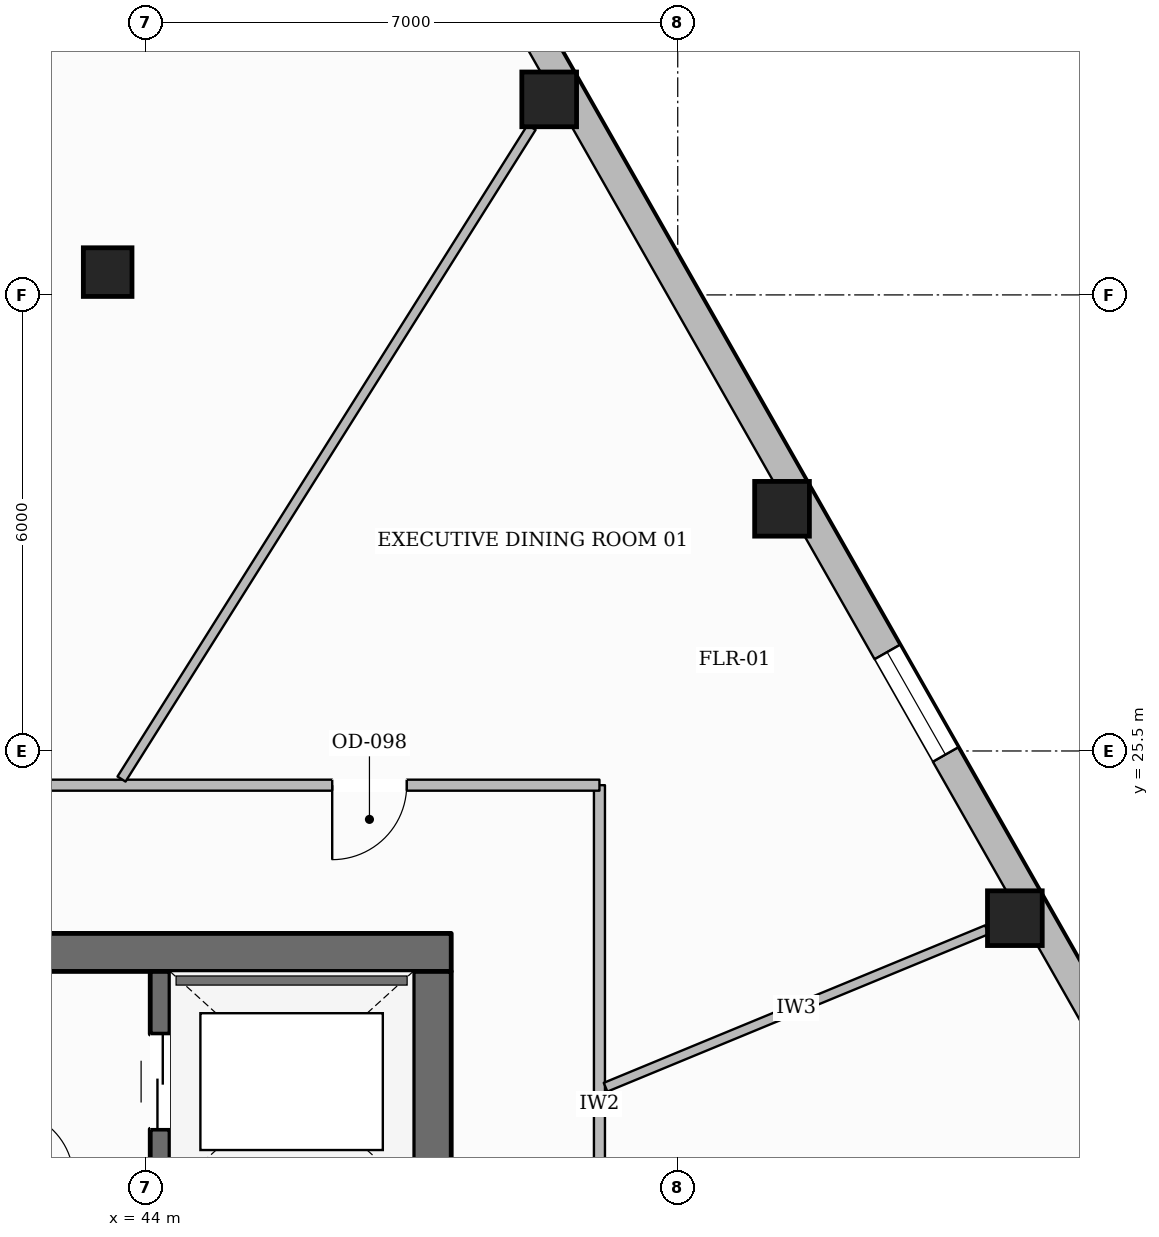
"""IFC4 building model, lengths in metres.
Left out: names, types, materials, properties, quantities, classifications, styles, units other than length and angle.
Written with IfcOpenShell. Run it as: python <this file> out.ifc"""

import sys

from ifc_helpers import new_model, si_unit, direction, frame, frame_2d, origin, origin_2d, place, context, subcontext, project, spatial, rectangle, hollow_rectangle, extrude, element, fill, save


model = new_model("IFC4")
c1 = context("Model", 3, precision=1e-05, world=origin(), true_north=direction((0.0, 1.0)))
c2 = subcontext(c1, "Body", "Model", "MODEL_VIEW")
j1 = project(units=[si_unit("LENGTHUNIT", "METRE"), si_unit("PLANEANGLEUNIT", "RADIAN")], contexts=[c1])
p1 = place(None, origin())
s1 = spatial("IfcSite", under=j1, at=p1, CompositionType="ELEMENT")
p2 = place(p1, origin())
s2 = spatial("IfcBuilding", under=s1, at=p2, CompositionType="ELEMENT")
p3 = place(p2, frame((0.0, 0.0, 150.95)))
s3 = spatial("IfcBuildingStorey", under=s2, at=p3, CompositionType="ELEMENT", Elevation=150.95)
p4 = place(p3, frame((27.98, 22.85, 0.0), z_axis=(0.0, 0.0, 1.0), x_axis=(1.0, 0.0, 0.0)))
e1 = element("IfcWall", 1, at=p4, inside=s3, PredefinedType="SOLIDWALL", context=c2, shape_type="SweptSolid", body=[
    extrude(rectangle(XDim=20.04, YDim=0.5, at=frame_2d((10.02, 0.0))), origin(), (0.0, 0.0, 1.0), 3.43),
])
p5 = place(p4, frame((6.295, 0.0, 0.0)))
e2 = element("IfcOpeningElement", 2, at=p5, cuts=e1, PredefinedType="OPENING", context=c2, shape_type="SweptSolid", body=[
    extrude(rectangle(XDim=1.05, YDim=2.15, at=frame_2d((0.525, 1.075))), frame((0.0, 0.26, 0.0), z_axis=(0.0, -1.0, 0.0), x_axis=(1.0, 0.0, 0.0)), (0.0, 0.0, 1.0), 0.52),
])
p6 = place(p4, frame((12.695, 0.0, 0.0)))
e3 = element("IfcOpeningElement", 3, at=p6, cuts=e1, PredefinedType="OPENING", context=c2, shape_type="SweptSolid", body=[
    extrude(rectangle(XDim=1.05, YDim=2.15, at=frame_2d((0.525, 1.075))), frame((0.0, 0.26, 0.0), z_axis=(0.0, -1.0, 0.0), x_axis=(1.0, 0.0, 0.0)), (0.0, 0.0, 1.0), 0.52),
])
p7 = place(p3, frame((47.77, 9.6, 0.0), z_axis=(0.0, 0.0, 1.0), x_axis=(0.0, 1.0, 0.0)))
e4 = element("IfcWall", 4, at=p7, inside=s3, PredefinedType="SOLIDWALL", context=c2, shape_type="SweptSolid", body=[
    extrude(rectangle(XDim=13.0, YDim=0.5, at=frame_2d((6.5, 0.0))), origin(), (0.0, 0.0, 1.0), 3.43),
])
p8 = place(p7, frame((0.2, 0.0, 0.0)))
e5 = element("IfcOpeningElement", 5, at=p8, cuts=e4, PredefinedType="OPENING", context=c2, shape_type="SweptSolid", body=[
    extrude(rectangle(XDim=1.1, YDim=2.15, at=frame_2d((0.55, 1.075))), frame((0.0, 0.26, 0.0), z_axis=(0.0, -1.0, 0.0), x_axis=(1.0, 0.0, 0.0)), (0.0, 0.0, 1.0), 0.52),
])
p9 = place(p7, frame((8.4, 0.0, 0.0)))
e6 = element("IfcOpeningElement", 6, at=p9, cuts=e4, PredefinedType="OPENING", context=c2, shape_type="SweptSolid", body=[
    extrude(rectangle(XDim=0.9, YDim=2.1, at=frame_2d((0.45, 1.05))), frame((0.0, 0.26, 0.0), z_axis=(0.0, -1.0, 0.0), x_axis=(1.0, 0.0, 0.0)), (0.0, 0.0, 1.0), 0.52),
])
p10 = place(p3, frame((44.19, 9.6, 0.0), z_axis=(0.0, 0.0, 1.0), x_axis=(0.0, 1.0, 0.0)))
e7 = element("IfcWall", 7, at=p10, inside=s3, PredefinedType="SHEAR", context=c2, shape_type="SweptSolid", body=[
    extrude(rectangle(XDim=13.0, YDim=0.26, at=frame_2d((6.5, 0.0))), origin(), (0.0, 0.0, 1.0), 3.43),
])
p11 = place(p10, frame((10.925, 0.0, 0.0)))
e8 = element("IfcOpeningElement", 8, at=p11, cuts=e7, PredefinedType="OPENING", context=c2, shape_type="SweptSolid", body=[
    extrude(rectangle(XDim=1.25, YDim=2.25, at=frame_2d((0.625, 1.125))), frame((0.0, 0.14, 0.0), z_axis=(0.0, -1.0, 0.0), x_axis=(1.0, 0.0, 0.0)), (0.0, 0.0, 1.0), 0.28),
])
for number, where, z_axis, x_axis in (
    (9, (55.435, 23.3, 0.0), (0.0, 0.0, 1.0), (1.0, 0.0, 0.0)),
    (10, (52.372, 28.686, 0.0), (0.0, 0.0, 1.0), (1.0, 0.0, 0.0)),
    (11, (49.309, 34.073, 0.0), (0.0, 0.0, 1.0), (1.0, 0.0, 0.0)),
):
    element("IfcColumn", number, at=place(p3, frame(where, z_axis=z_axis, x_axis=x_axis)), inside=s3, PredefinedType="COLUMN", context=c2, shape_type="SweptSolid", body=[
        extrude(hollow_rectangle(XDim=0.72, YDim=0.72, WallThickness=0.032, at=origin_2d()), origin(), (0.0, 0.0, 1.0), 3.43),
    ])
p12 = place(p3, frame((43.5, 31.8, 0.0), z_axis=(0.0, 0.0, 1.0), x_axis=(1.0, 0.0, 0.0)))
e12 = element("IfcColumn", 12, at=p12, inside=s3, PredefinedType="COLUMN", context=c2, shape_type="SweptSolid", body=[
    extrude(hollow_rectangle(XDim=0.64, YDim=0.64, WallThickness=0.028, at=origin_2d()), origin(), (0.0, 0.0, 1.0), 3.43),
])
p13 = place(p3, frame((43.179, 45.396, 0.0), z_axis=(0.0, 0.0, 1.0), x_axis=(0.494363218784, -0.869255433065, 0.0)))
e13 = element("IfcWall", 13, at=p13, inside=s3, PredefinedType="STANDARD", context=c2, shape_type="SweptSolid", body=[
    extrude(rectangle(XDim=38.134, YDim=0.38, at=frame_2d((19.067, 0.0))), origin(), (0.0, 0.0, 1.0), 2.889),
])
p14 = place(p13, frame((9.134, 0.0, 0.0)))
e14 = element("IfcOpeningElement", 14, at=p14, cuts=e13, PredefinedType="OPENING", context=c2, shape_type="SweptSolid", body=[
    extrude(rectangle(XDim=1.0, YDim=2.2, at=frame_2d((0.5, 1.1))), frame((0.0, 0.2, 0.0), z_axis=(0.0, -1.0, 0.0), x_axis=(1.0, 0.0, 0.0)), (0.0, 0.0, 1.0), 0.4),
])
p15 = place(p13, frame((33.785, 0.0, 0.55)))
e15 = element("IfcOpeningElement", 15, at=p15, cuts=e13, PredefinedType="OPENING", context=c2, shape_type="SweptSolid", body=[
    extrude(rectangle(XDim=1.55, YDim=1.6, at=frame_2d((0.775, 0.8))), frame((0.0, 0.2, 0.0), z_axis=(0.0, -1.0, 0.0), x_axis=(1.0, 0.0, 0.0)), (0.0, 0.0, 1.0), 0.4),
])
p16 = place(p13, frame((27.589, 0.0, 0.55)))
e16 = element("IfcOpeningElement", 16, at=p16, cuts=e13, PredefinedType="OPENING", context=c2, shape_type="SweptSolid", body=[
    extrude(rectangle(XDim=1.55, YDim=1.6, at=frame_2d((0.775, 0.8))), frame((0.0, 0.2, 0.0), z_axis=(0.0, -1.0, 0.0), x_axis=(1.0, 0.0, 0.0)), (0.0, 0.0, 1.0), 0.4),
])
p17 = place(p13, frame((21.393, 0.0, 0.55)))
e17 = element("IfcOpeningElement", 17, at=p17, cuts=e13, PredefinedType="OPENING", context=c2, shape_type="SweptSolid", body=[
    extrude(rectangle(XDim=1.55, YDim=1.6, at=frame_2d((0.775, 0.8))), frame((0.0, 0.2, 0.0), z_axis=(0.0, -1.0, 0.0), x_axis=(1.0, 0.0, 0.0)), (0.0, 0.0, 1.0), 0.4),
])
p18 = place(p13, frame((2.805, 0.0, 0.55)))
e18 = element("IfcOpeningElement", 18, at=p18, cuts=e13, PredefinedType="OPENING", context=c2, shape_type="SweptSolid", body=[
    extrude(rectangle(XDim=1.55, YDim=1.6, at=frame_2d((0.775, 0.8))), frame((0.0, 0.2, 0.0), z_axis=(0.0, -1.0, 0.0), x_axis=(1.0, 0.0, 0.0)), (0.0, 0.0, 1.0), 0.4),
])
p19 = place(p3, frame((49.97, 7.15, 0.0), z_axis=(0.0, 0.0, 1.0), x_axis=(0.0, 1.0, 0.0)))
e19 = element("IfcWall", 19, at=p19, inside=s3, PredefinedType="PARTITIONING", context=c2, shape_type="SweptSolid", body=[
    extrude(rectangle(XDim=17.9, YDim=0.145, at=frame_2d((8.95, 0.0))), origin(), (0.0, 0.0, 1.0), 3.118),
])
p20 = place(p19, frame((8.246, 0.0, 0.0)))
e20 = element("IfcOpeningElement", 20, at=p20, cuts=e19, PredefinedType="OPENING", context=c2, shape_type="SweptSolid", body=[
    extrude(rectangle(XDim=1.02, YDim=2.15, at=frame_2d((0.51, 1.075))), frame((0.0, 0.083, 0.0), z_axis=(0.0, -1.0, 0.0), x_axis=(1.0, 0.0, 0.0)), (0.0, 0.0, 1.0), 0.165),
])
p21 = place(p3, frame((49.97, 25.05, 0.0), z_axis=(0.0, 0.0, 1.0), x_axis=(-1.0, 0.0, 0.0)))
e21 = element("IfcWall", 21, at=p21, inside=s3, PredefinedType="PARTITIONING", context=c2, shape_type="SweptSolid", body=[
    extrude(rectangle(XDim=23.94, YDim=0.145, at=frame_2d((11.97, 0.0))), origin(), (0.0, 0.0, 1.0), 3.43),
])
p22 = place(p21, frame((2.536, 0.0, 0.0)))
e22 = element("IfcOpeningElement", 22, at=p22, cuts=e21, PredefinedType="OPENING", context=c2, shape_type="SweptSolid", body=[
    extrude(rectangle(XDim=0.98, YDim=2.15, at=frame_2d((0.49, 1.075))), frame((0.0, 0.083, 0.0), z_axis=(0.0, -1.0, 0.0), x_axis=(1.0, 0.0, 0.0)), (0.0, 0.0, 1.0), 0.165),
])
p23 = place(p21, frame((9.289, 0.0, 0.0)))
e23 = element("IfcOpeningElement", 23, at=p23, cuts=e21, PredefinedType="OPENING", context=c2, shape_type="SweptSolid", body=[
    extrude(rectangle(XDim=1.4, YDim=2.2, at=frame_2d((0.7, 1.1))), frame((0.0, 0.083, 0.0), z_axis=(0.0, -1.0, 0.0), x_axis=(1.0, 0.0, 0.0)), (0.0, 0.0, 1.0), 0.165),
])
p24 = place(p21, frame((17.451, 0.0, 0.0)))
e24 = element("IfcOpeningElement", 24, at=p24, cuts=e21, PredefinedType="OPENING", context=c2, shape_type="SweptSolid", body=[
    extrude(rectangle(XDim=1.4, YDim=2.2, at=frame_2d((0.7, 1.1))), frame((0.0, 0.083, 0.0), z_axis=(0.0, -1.0, 0.0), x_axis=(1.0, 0.0, 0.0)), (0.0, 0.0, 1.0), 0.165),
])
p25 = place(p3, frame((50.051, 21.076, 0.0), z_axis=(0.0, 0.0, 1.0), x_axis=(0.924287300844, 0.38169750523, 0.0)))
e25 = element("IfcWall", 25, at=p25, inside=s3, PredefinedType="PARTITIONING", context=c2, shape_type="SweptSolid", body=[
    extrude(rectangle(XDim=5.428, YDim=0.125, at=frame_2d((2.714, 0.0))), origin(), (0.0, 0.0, 1.0), 3.43),
])
p26 = place(p3, frame((43.682, 25.131, 0.0), z_axis=(0.0, 0.0, 1.0), x_axis=(0.53258313075, 0.846377698691, 0.0)))
e26 = element("IfcWall", 26, at=p26, inside=s3, PredefinedType="PARTITIONING", context=c2, shape_type="SweptSolid", body=[
    extrude(rectangle(XDim=10.13, YDim=0.125, at=frame_2d((5.065, 0.0))), origin(), (0.0, 0.0, 1.0), 3.43),
])
p27 = place(p17, origin())
e27 = element("IfcWindow", 27, at=p27, inside=s3, PartitioningType="SINGLE_PANEL", PredefinedType="WINDOW", context=c2, shape_type="SweptSolid", body=[
    extrude(rectangle(XDim=1.55, YDim=1.6, at=frame_2d((0.775, 0.8))), frame((0.0, 0.03, 0.0), z_axis=(0.0, -1.0, 0.0), x_axis=(1.0, 0.0, 0.0)), (0.0, 0.0, 1.0), 0.06),
])
fill(e17, e27)
p28 = place(p11, origin())
e28 = element("IfcDoor", 28, at=p28, inside=s3, OperationType="DOUBLE_DOOR_SLIDING", PredefinedType="DOOR", context=c2, shape_type="SweptSolid", body=[
    extrude(rectangle(XDim=1.25, YDim=2.25, at=frame_2d((0.625, 1.125))), frame((0.0, 0.025, 0.0), z_axis=(0.0, -1.0, 0.0), x_axis=(1.0, 0.0, 0.0)), (0.0, 0.0, 1.0), 0.05),
])
fill(e8, e28)
p29 = place(p22, origin())
e29 = element("IfcDoor", 29, at=p29, inside=s3, OperationType="SINGLE_SWING_RIGHT", PredefinedType="DOOR", context=c2, shape_type="SweptSolid", body=[
    extrude(rectangle(XDim=0.98, YDim=2.15, at=frame_2d((0.49, 1.075))), frame((0.0, 0.025, 0.0), z_axis=(0.0, -1.0, 0.0), x_axis=(1.0, 0.0, 0.0)), (0.0, 0.0, 1.0), 0.05),
])
fill(e22, e29)
save(model, sys.argv[1])
